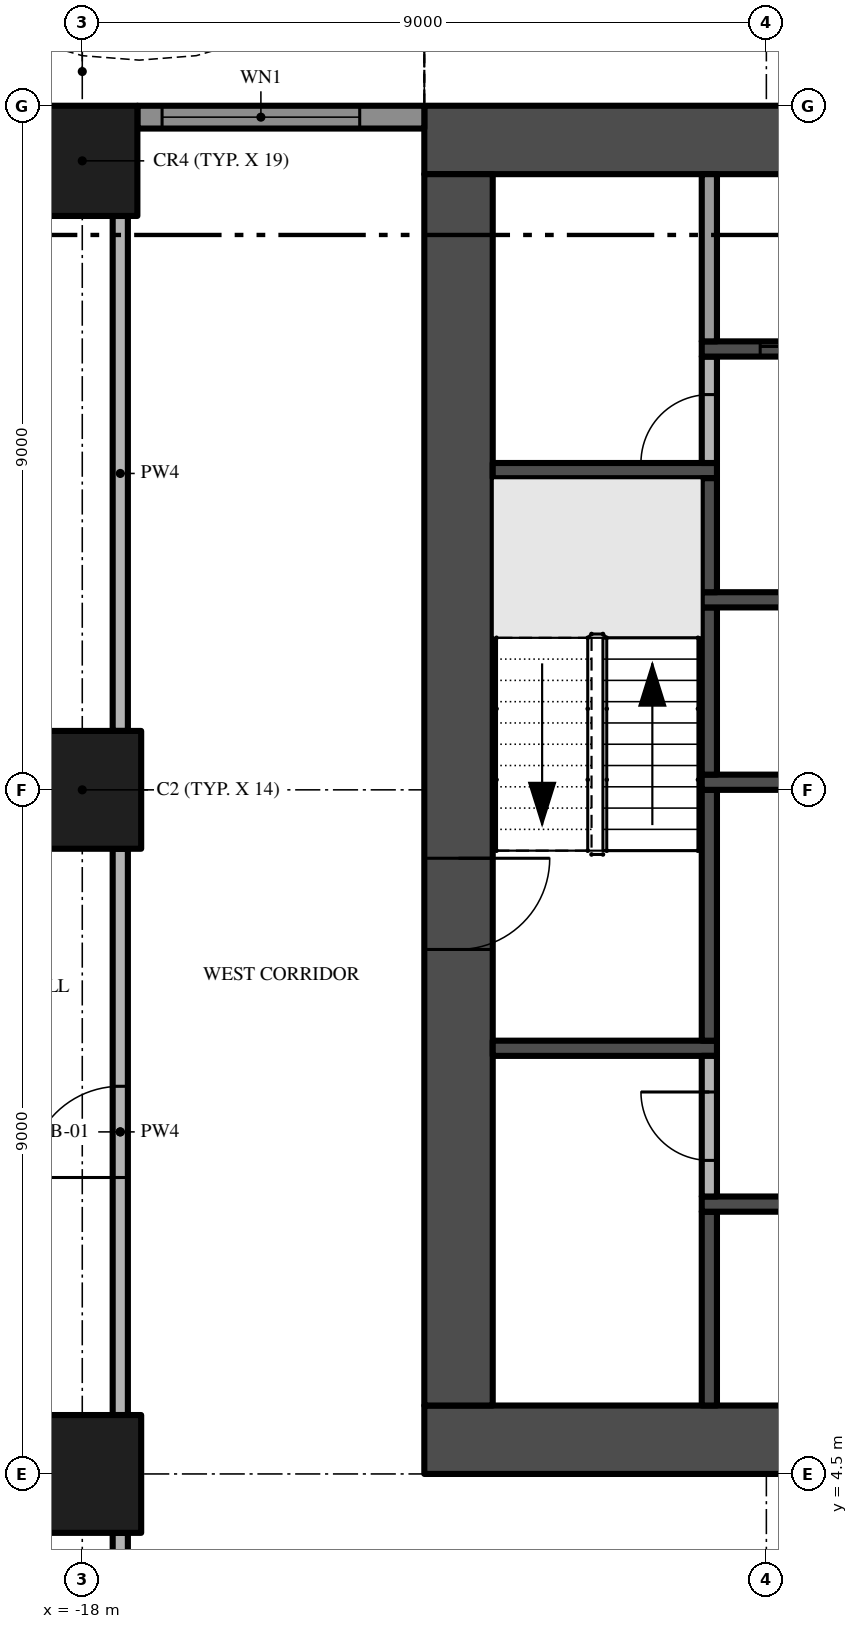
"""IFC4 building model, lengths in metres.
Left out: names, types, materials, properties, quantities, classifications, styles, units other than length and angle.
Written with IfcOpenShell. Run it as: python <this file> out.ifc"""

import sys

from ifc_helpers import new_model, si_unit, direction, frame, frame_2d, origin, origin_2d, place, context, subcontext, project, spatial, polyline, rectangle, outline, extrude, element, fill, save


model = new_model("IFC4")
c1 = context("Model", 3, precision=1e-05, world=origin(), true_north=direction((0.0, 1.0)))
c2 = subcontext(c1, "Body", "Model", "MODEL_VIEW")
j1 = project(units=[si_unit("LENGTHUNIT", "METRE"), si_unit("PLANEANGLEUNIT", "RADIAN")], contexts=[c1])
p1 = place(None, origin())
s1 = spatial("IfcSite", under=j1, at=p1, CompositionType="ELEMENT")
p2 = place(p1, origin())
s2 = spatial("IfcBuilding", under=s1, at=p2, CompositionType="ELEMENT")
p3 = place(p2, frame((0.0, 0.0, 30.2)))
s3 = spatial("IfcBuildingStorey", under=s2, at=p3, CompositionType="ELEMENT", Elevation=30.2)
p4 = place(p3, frame((-13.5, 4.95, -0.3), z_axis=(0.0, 0.0, 1.0), x_axis=(1.0, 0.0, 0.0)))
e1 = element("IfcWall", 1, at=p4, inside=s3, PredefinedType="SHEAR", context=c2, shape_type="SweptSolid", body=[
    extrude(rectangle(XDim=27.0, YDim=0.9, at=frame_2d((13.5, 0.0))), origin(), (0.0, 0.0, 1.0), 3.8),
])
p5 = place(p4, frame((12.0, 0.0, 0.3)))
e2 = element("IfcOpeningElement", 2, at=p5, cuts=e1, PredefinedType="OPENING", context=c2, shape_type="SweptSolid", body=[
    extrude(rectangle(XDim=3.0, YDim=2.4, at=frame_2d((1.5, 1.2))), frame((0.0, 0.46, 0.0), z_axis=(0.0, -1.0, 0.0), x_axis=(1.0, 0.0, 0.0)), (0.0, 0.0, 1.0), 0.92),
])
p6 = place(p4, frame((4.9, 0.0, 0.3)))
e3 = element("IfcOpeningElement", 3, at=p6, cuts=e1, PredefinedType="OPENING", context=c2, shape_type="SweptSolid", body=[
    extrude(rectangle(XDim=1.2, YDim=2.2, at=frame_2d((0.6, 1.1))), frame((0.0, 0.46, 0.0), z_axis=(0.0, -1.0, 0.0), x_axis=(1.0, 0.0, 0.0)), (0.0, 0.0, 1.0), 0.92),
])
p7 = place(p4, frame((20.75, 0.0, 0.3)))
e4 = element("IfcOpeningElement", 4, at=p7, cuts=e1, PredefinedType="OPENING", context=c2, shape_type="SweptSolid", body=[
    extrude(rectangle(XDim=1.5, YDim=2.2, at=frame_2d((0.75, 1.1))), frame((0.0, 0.46, 0.0), z_axis=(0.0, -1.0, 0.0), x_axis=(1.0, 0.0, 0.0)), (0.0, 0.0, 1.0), 0.92),
])
p8 = place(p4, frame((17.4, 0.0, 0.3)))
e5 = element("IfcOpeningElement", 5, at=p8, cuts=e1, PredefinedType="OPENING", context=c2, shape_type="SweptSolid", body=[
    extrude(rectangle(XDim=1.2, YDim=2.2, at=frame_2d((0.6, 1.1))), frame((0.0, 0.46, 0.0), z_axis=(0.0, -1.0, 0.0), x_axis=(1.0, 0.0, 0.0)), (0.0, 0.0, 1.0), 0.92),
])
p9 = place(p3, frame((13.5, 22.05, -0.3), z_axis=(0.0, 0.0, 1.0), x_axis=(-1.0, 0.0, 0.0)))
e6 = element("IfcWall", 6, at=p9, inside=s3, PredefinedType="SHEAR", context=c2, shape_type="SweptSolid", body=[
    extrude(rectangle(XDim=27.0, YDim=0.9, at=frame_2d((13.5, 0.0))), origin(), (0.0, 0.0, 1.0), 3.8),
])
p10 = place(p3, frame((-13.05, 21.6, -0.3), z_axis=(0.0, 0.0, 1.0), x_axis=(0.0, -1.0, 0.0)))
e7 = element("IfcWall", 7, at=p10, inside=s3, PredefinedType="SHEAR", context=c2, shape_type="SweptSolid", body=[
    extrude(rectangle(XDim=16.2, YDim=0.9, at=frame_2d((8.1, 0.0))), origin(), (0.0, 0.0, 1.0), 3.8),
])
p11 = place(p10, frame((9.0, 0.0, 0.3)))
e8 = element("IfcOpeningElement", 8, at=p11, cuts=e7, PredefinedType="OPENING", context=c2, shape_type="SweptSolid", body=[
    extrude(rectangle(XDim=1.2, YDim=2.2, at=frame_2d((0.6, 1.1))), frame((0.0, 0.46, 0.0), z_axis=(0.0, -1.0, 0.0), x_axis=(1.0, 0.0, 0.0)), (0.0, 0.0, 1.0), 0.92),
])
p12 = place(p3, frame((-18.0, 13.5, 0.0), z_axis=(0.0, 0.0, 1.0), x_axis=(1.0, 0.0, 0.0)))
e9 = element("IfcColumn", 9, at=p12, inside=s3, PredefinedType="COLUMN", context=c2, shape_type="SweptSolid", body=[
    extrude(rectangle(XDim=1.55, YDim=1.55, at=origin_2d()), origin(), (0.0, 0.0, 1.0), 3.5),
])
p13 = place(p3, frame((-18.0, 21.775, 0.0), z_axis=(0.0, 0.0, 1.0), x_axis=(1.0, 0.0, 0.0)))
e10 = element("IfcColumn", 10, at=p13, inside=s3, PredefinedType="COLUMN", context=c2, shape_type="SweptSolid", body=[
    extrude(rectangle(XDim=1.45, YDim=1.45, at=origin_2d()), origin(), (0.0, 0.0, 1.0), 3.5),
])
p14 = place(p3, frame((-18.0, 4.5, 0.0), z_axis=(0.0, 0.0, 1.0), x_axis=(1.0, 0.0, 0.0)))
e11 = element("IfcColumn", 11, at=p14, inside=s3, PredefinedType="COLUMN", context=c2, shape_type="SweptSolid", body=[
    extrude(rectangle(XDim=1.55, YDim=1.55, at=origin_2d()), origin(), (0.0, 0.0, 1.0), 3.5),
])
p15 = place(p3, frame((-17.275, 22.35, 0.0), z_axis=(0.0, 0.0, 1.0), x_axis=(1.0, 0.0, 0.0)))
e12 = element("IfcWall", 12, at=p15, inside=s3, PredefinedType="SOLIDWALL", context=c2, shape_type="SweptSolid", body=[
    extrude(rectangle(XDim=3.775, YDim=0.3, at=frame_2d((1.887, 0.0))), origin(), (0.0, 0.0, 1.0), 3.5),
])
p16 = place(p15, frame((0.325, 0.0, 0.45)))
e13 = element("IfcOpeningElement", 13, at=p16, cuts=e12, PredefinedType="OPENING", context=c2, shape_type="SweptSolid", body=[
    extrude(rectangle(XDim=2.6, YDim=2.65, at=frame_2d((1.3, 1.325))), frame((0.0, 0.16, 0.0), z_axis=(0.0, -1.0, 0.0), x_axis=(1.0, 0.0, 0.0)), (0.0, 0.0, 1.0), 0.32),
])
p17 = place(p3, origin())
e14 = element("IfcWall", 14, at=p17, inside=s3, PredefinedType="USERDEFINED", context=c2, shape_type="SweptSolid", body=[
    extrude(outline(polyline([(-13.5, 24.3), (-15.0, 23.595), (-16.5, 23.159), (-17.25, 23.1), (-18.0, 23.159), (-19.5, 23.595), (-21.0, 24.3), (-22.5, 25.005), (-22.606, 24.779), (-21.106, 24.074), (-19.589, 23.36), (-18.045, 22.911), (-17.25, 22.849), (-16.455, 22.911), (-14.911, 23.36), (-13.394, 24.074), (-13.5, 24.3)])), origin(), (0.0, 0.0, 1.0), 0.9),
])
for number, where, z_axis, x_axis in (
    (15, (-12.6, 10.1, 0.0), (0.0, 0.0, 1.0), (1.0, 0.0, 0.0)),
    (16, (-12.6, 17.7, 0.0), (0.0, 0.0, 1.0), (1.0, 0.0, 0.0)),
):
    element("IfcWall", number, at=place(p3, frame(where, z_axis=z_axis, x_axis=x_axis)), inside=s3, PredefinedType="SHEAR", context=c2, shape_type="SweptSolid", body=[
        extrude(rectangle(XDim=2.95, YDim=0.2, at=frame_2d((1.475, 0.0))), origin(), (0.0, 0.0, 1.0), 3.5),
    ])
p18 = place(p3, frame((-9.75, 5.4, 0.0), z_axis=(0.0, 0.0, 1.0), x_axis=(0.0, 1.0, 0.0)))
e17 = element("IfcWall", 17, at=p18, inside=s3, PredefinedType="SHEAR", context=c2, shape_type="SweptSolid", body=[
    extrude(rectangle(XDim=2.55, YDim=0.2, at=frame_2d((1.275, 0.0))), origin(), (0.0, 0.0, 1.0), 3.5),
])
p19 = place(p3, frame((-9.85, 8.05, 0.0), z_axis=(0.0, 0.0, 1.0), x_axis=(1.0, 0.0, 0.0)))
e18 = element("IfcWall", 18, at=p19, inside=s3, PredefinedType="SHEAR", context=c2, shape_type="SweptSolid", body=[
    extrude(rectangle(XDim=8.35, YDim=0.2, at=frame_2d((4.175, 0.0))), origin(), (0.0, 0.0, 1.0), 3.5),
])
p20 = place(p3, frame((-9.75, 8.15, 0.0), z_axis=(0.0, 0.0, 1.0), x_axis=(0.0, 1.0, 0.0)))
e19 = element("IfcWall", 19, at=p20, inside=s3, PredefinedType="PARTITIONING", context=c2, shape_type="SweptSolid", body=[
    extrude(rectangle(XDim=1.85, YDim=0.2, at=frame_2d((0.925, 0.0))), origin(), (0.0, 0.0, 1.0), 3.5),
])
p21 = place(p20, frame((0.475, 0.0, 0.0)))
e20 = element("IfcOpeningElement", 20, at=p21, cuts=e19, PredefinedType="OPENING", context=c2, shape_type="SweptSolid", body=[
    extrude(rectangle(XDim=0.9, YDim=2.1, at=frame_2d((0.45, 1.05))), frame((0.0, 0.11, 0.0), z_axis=(0.0, -1.0, 0.0), x_axis=(1.0, 0.0, 0.0)), (0.0, 0.0, 1.0), 0.22),
])
p22 = place(p3, frame((-9.75, 10.2, 0.0), z_axis=(0.0, 0.0, 1.0), x_axis=(0.0, 1.0, 0.0)))
e21 = element("IfcWall", 21, at=p22, inside=s3, PredefinedType="SHEAR", context=c2, shape_type="SweptSolid", body=[
    extrude(rectangle(XDim=3.3, YDim=0.2, at=frame_2d((1.65, 0.0))), origin(), (0.0, 0.0, 1.0), 3.5),
])
p23 = place(p3, frame((-9.85, 13.6, 0.0), z_axis=(0.0, 0.0, 1.0), x_axis=(1.0, 0.0, 0.0)))
e22 = element("IfcWall", 22, at=p23, inside=s3, PredefinedType="SHEAR", context=c2, shape_type="SweptSolid", body=[
    extrude(rectangle(XDim=8.35, YDim=0.2, at=frame_2d((4.175, 0.0))), origin(), (0.0, 0.0, 1.0), 3.5),
])
p24 = place(p3, frame((-9.75, 13.7, 0.0), z_axis=(0.0, 0.0, 1.0), x_axis=(0.0, 1.0, 0.0)))
e23 = element("IfcWall", 23, at=p24, inside=s3, PredefinedType="SHEAR", context=c2, shape_type="SweptSolid", body=[
    extrude(rectangle(XDim=2.2, YDim=0.2, at=frame_2d((1.1, 0.0))), origin(), (0.0, 0.0, 1.0), 3.5),
])
p25 = place(p3, frame((-1.5, 16.0, 0.0), z_axis=(0.0, 0.0, 1.0), x_axis=(-1.0, 0.0, 0.0)))
e24 = element("IfcWall", 24, at=p25, inside=s3, PredefinedType="SHEAR", context=c2, shape_type="SweptSolid", body=[
    extrude(rectangle(XDim=8.35, YDim=0.2, at=frame_2d((4.175, 0.0))), origin(), (0.0, 0.0, 1.0), 3.5),
])
p26 = place(p25, frame((6.162, 0.0, 0.0)))
e25 = element("IfcOpeningElement", 25, at=p26, cuts=e24, PredefinedType="OPENING", context=c2, shape_type="SweptSolid", body=[
    extrude(rectangle(XDim=0.9, YDim=2.1, at=frame_2d((0.45, 1.05))), frame((0.0, 0.11, 0.0), z_axis=(0.0, -1.0, 0.0), x_axis=(1.0, 0.0, 0.0)), (0.0, 0.0, 1.0), 0.22),
])
p27 = place(p3, frame((-9.75, 16.1, 0.0), z_axis=(0.0, 0.0, 1.0), x_axis=(0.0, 1.0, 0.0)))
e26 = element("IfcWall", 26, at=p27, inside=s3, PredefinedType="SHEAR", context=c2, shape_type="SweptSolid", body=[
    extrude(rectangle(XDim=1.5, YDim=0.2, at=frame_2d((0.75, 0.0))), origin(), (0.0, 0.0, 1.0), 3.5),
])
p28 = place(p3, frame((-9.75, 17.8, 0.0), z_axis=(0.0, 0.0, 1.0), x_axis=(0.0, 1.0, 0.0)))
e27 = element("IfcWall", 27, at=p28, inside=s3, PredefinedType="PARTITIONING", context=c2, shape_type="SweptSolid", body=[
    extrude(rectangle(XDim=1.4, YDim=0.2, at=frame_2d((0.7, 0.0))), origin(), (0.0, 0.0, 1.0), 3.5),
])
p29 = place(p28, origin())
e28 = element("IfcOpeningElement", 28, at=p29, cuts=e27, PredefinedType="OPENING", context=c2, shape_type="SweptSolid", body=[
    extrude(rectangle(XDim=0.9, YDim=2.1, at=frame_2d((0.45, 1.05))), frame((0.0, 0.11, 0.0), z_axis=(0.0, -1.0, 0.0), x_axis=(1.0, 0.0, 0.0)), (0.0, 0.0, 1.0), 0.22),
])
p30 = place(p3, frame((-9.85, 19.3, 0.0), z_axis=(0.0, 0.0, 1.0), x_axis=(1.0, 0.0, 0.0)))
e29 = element("IfcWall", 29, at=p30, inside=s3, PredefinedType="SHEAR", context=c2, shape_type="SweptSolid", body=[
    extrude(rectangle(XDim=19.7, YDim=0.2, at=frame_2d((9.85, 0.0))), origin(), (0.0, 0.0, 1.0), 3.5),
])
p31 = place(p30, frame((0.769, 0.0, 0.0)))
e30 = element("IfcOpeningElement", 30, at=p31, cuts=e29, PredefinedType="OPENING", context=c2, shape_type="SweptSolid", body=[
    extrude(rectangle(XDim=1.1, YDim=2.1, at=frame_2d((0.55, 1.05))), frame((0.0, 0.11, 0.0), z_axis=(0.0, -1.0, 0.0), x_axis=(1.0, 0.0, 0.0)), (0.0, 0.0, 1.0), 0.22),
])
p32 = place(p30, frame((3.206, 0.0, 0.0)))
e31 = element("IfcOpeningElement", 31, at=p32, cuts=e29, PredefinedType="OPENING", context=c2, shape_type="SweptSolid", body=[
    extrude(rectangle(XDim=1.1, YDim=2.1, at=frame_2d((0.55, 1.05))), frame((0.0, 0.11, 0.0), z_axis=(0.0, -1.0, 0.0), x_axis=(1.0, 0.0, 0.0)), (0.0, 0.0, 1.0), 0.22),
])
p33 = place(p30, frame((5.644, 0.0, 0.0)))
e32 = element("IfcOpeningElement", 32, at=p33, cuts=e29, PredefinedType="OPENING", context=c2, shape_type="SweptSolid", body=[
    extrude(rectangle(XDim=1.1, YDim=2.1, at=frame_2d((0.55, 1.05))), frame((0.0, 0.11, 0.0), z_axis=(0.0, -1.0, 0.0), x_axis=(1.0, 0.0, 0.0)), (0.0, 0.0, 1.0), 0.22),
])
p34 = place(p30, frame((8.081, 0.0, 0.0)))
e33 = element("IfcOpeningElement", 33, at=p34, cuts=e29, PredefinedType="OPENING", context=c2, shape_type="SweptSolid", body=[
    extrude(rectangle(XDim=1.1, YDim=2.1, at=frame_2d((0.55, 1.05))), frame((0.0, 0.11, 0.0), z_axis=(0.0, -1.0, 0.0), x_axis=(1.0, 0.0, 0.0)), (0.0, 0.0, 1.0), 0.22),
])
p35 = place(p3, frame((-9.75, 19.4, 0.0), z_axis=(0.0, 0.0, 1.0), x_axis=(0.0, 1.0, 0.0)))
e34 = element("IfcWall", 34, at=p35, inside=s3, PredefinedType="PARTITIONING", context=c2, shape_type="SweptSolid", body=[
    extrude(rectangle(XDim=2.2, YDim=0.2, at=frame_2d((1.1, 0.0))), origin(), (0.0, 0.0, 1.0), 3.5),
])
p36 = place(p3, frame((-17.5, -0.2, 0.0), z_axis=(0.0, 0.0, 1.0), x_axis=(0.0, 1.0, 0.0)))
e35 = element("IfcWall", 35, at=p36, inside=s3, PredefinedType="PARTITIONING", context=c2, shape_type="SweptSolid", body=[
    extrude(rectangle(XDim=3.925, YDim=0.2, at=frame_2d((1.962, 0.0))), origin(), (0.0, 0.0, 1.0), 3.5),
])
p37 = place(p3, frame((-17.5, 5.275, 0.0), z_axis=(0.0, 0.0, 1.0), x_axis=(0.0, 1.0, 0.0)))
e36 = element("IfcWall", 36, at=p37, inside=s3, PredefinedType="PARTITIONING", context=c2, shape_type="SweptSolid", body=[
    extrude(rectangle(XDim=7.45, YDim=0.2, at=frame_2d((3.725, 0.0))), origin(), (0.0, 0.0, 1.0), 3.5),
])
p38 = place(p37, frame((3.125, 0.0, 0.0)))
e37 = element("IfcOpeningElement", 37, at=p38, cuts=e36, PredefinedType="OPENING", context=c2, shape_type="SweptSolid", body=[
    extrude(rectangle(XDim=1.2, YDim=2.4, at=frame_2d((0.6, 1.2))), frame((0.0, 0.11, 0.0), z_axis=(0.0, -1.0, 0.0), x_axis=(1.0, 0.0, 0.0)), (0.0, 0.0, 1.0), 0.22),
])
p39 = place(p3, frame((-17.5, 14.275, 0.0), z_axis=(0.0, 0.0, 1.0), x_axis=(0.0, 1.0, 0.0)))
e38 = element("IfcWall", 38, at=p39, inside=s3, PredefinedType="PARTITIONING", context=c2, shape_type="SweptSolid", body=[
    extrude(rectangle(XDim=6.775, YDim=0.2, at=frame_2d((3.388, 0.0))), origin(), (0.0, 0.0, 1.0), 3.5),
])
p40 = place(p16, origin())
e39 = element("IfcWindow", 39, at=p40, inside=s3, PartitioningType="SINGLE_PANEL", PredefinedType="WINDOW", context=c2, shape_type="SweptSolid", body=[
    extrude(rectangle(XDim=2.6, YDim=2.65, at=frame_2d((1.3, 1.325))), frame((0.0, 0.03, 0.0), z_axis=(0.0, -1.0, 0.0), x_axis=(1.0, 0.0, 0.0)), (0.0, 0.0, 1.0), 0.06),
])
fill(e13, e39)
p41 = place(p11, frame((1.2, 0.0, 0.0), z_axis=(0.0, 0.0, 1.0), x_axis=(-1.0, 0.0, 0.0)))
e40 = element("IfcDoor", 40, at=p41, inside=s3, OperationType="SINGLE_SWING_RIGHT", PredefinedType="DOOR", context=c2, shape_type="SweptSolid", body=[
    extrude(rectangle(XDim=1.2, YDim=2.2, at=frame_2d((0.6, 1.1))), frame((0.0, 0.025, 0.0), z_axis=(0.0, -1.0, 0.0), x_axis=(1.0, 0.0, 0.0)), (0.0, 0.0, 1.0), 0.05),
])
fill(e8, e40)
p42 = place(p31, origin())
e41 = element("IfcDoor", 41, at=p42, inside=s3, OperationType="SLIDING_TO_LEFT", PredefinedType="DOOR", context=c2, shape_type="SweptSolid", body=[
    extrude(rectangle(XDim=1.1, YDim=2.1, at=frame_2d((0.55, 1.05))), frame((0.0, 0.025, 0.0), z_axis=(0.0, -1.0, 0.0), x_axis=(1.0, 0.0, 0.0)), (0.0, 0.0, 1.0), 0.05),
])
fill(e30, e41)
p43 = place(p29, origin())
e42 = element("IfcDoor", 42, at=p43, inside=s3, OperationType="SINGLE_SWING_LEFT", PredefinedType="DOOR", context=c2, shape_type="SweptSolid", body=[
    extrude(rectangle(XDim=0.9, YDim=2.1, at=frame_2d((0.45, 1.05))), frame((0.0, 0.025, 0.0), z_axis=(0.0, -1.0, 0.0), x_axis=(1.0, 0.0, 0.0)), (0.0, 0.0, 1.0), 0.05),
])
fill(e28, e42)
p44 = place(p21, origin())
e43 = element("IfcDoor", 43, at=p44, inside=s3, OperationType="SINGLE_SWING_RIGHT", PredefinedType="DOOR", context=c2, shape_type="SweptSolid", body=[
    extrude(rectangle(XDim=0.9, YDim=2.1, at=frame_2d((0.45, 1.05))), frame((0.0, 0.025, 0.0), z_axis=(0.0, -1.0, 0.0), x_axis=(1.0, 0.0, 0.0)), (0.0, 0.0, 1.0), 0.05),
])
fill(e20, e43)
p45 = place(p38, origin())
e44 = element("IfcDoor", 44, at=p45, inside=s3, OperationType="SINGLE_SWING_LEFT", PredefinedType="DOOR", context=c2, shape_type="SweptSolid", body=[
    extrude(rectangle(XDim=1.2, YDim=2.4, at=frame_2d((0.6, 1.2))), frame((0.0, 0.025, 0.0), z_axis=(0.0, -1.0, 0.0), x_axis=(1.0, 0.0, 0.0)), (0.0, 0.0, 1.0), 0.05),
])
fill(e37, e44)
save(model, sys.argv[1])
